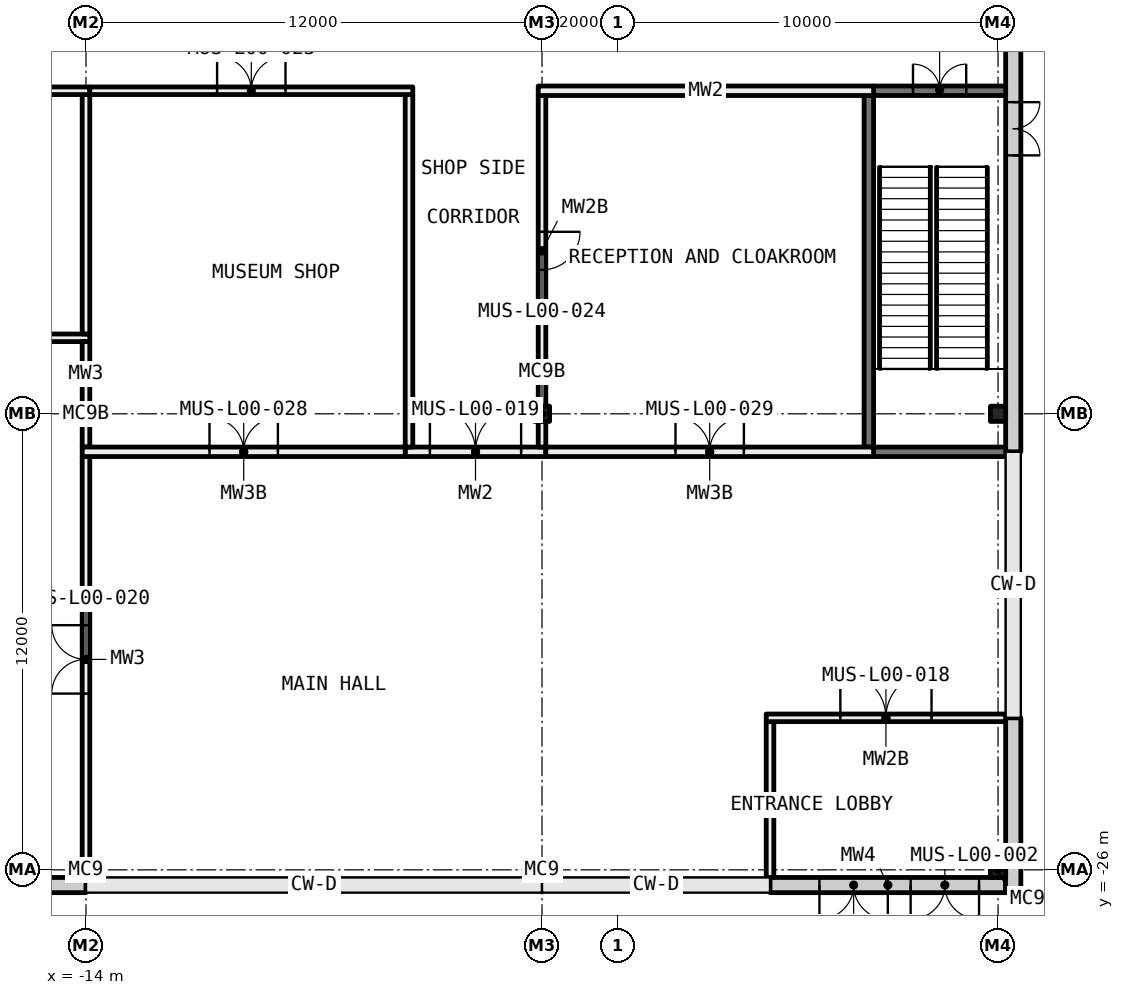
"""IFC4 building model, lengths in metres.
Left out: names, types, materials, properties, quantities, classifications, styles, units other than length and angle.
Written with IfcOpenShell. Run it as: python <this file> out.ifc"""

import sys

from ifc_helpers import new_model, si_unit, direction, frame, frame_2d, origin, origin_2d, place, context, subcontext, project, spatial, rectangle, i_section, extrude, element, fill, save


model = new_model("IFC4")
c1 = context("Model", 3, precision=1e-05, world=origin(), true_north=direction((0.0, 1.0)))
c2 = subcontext(c1, "Body", "Model", "MODEL_VIEW")
j1 = project(units=[si_unit("LENGTHUNIT", "METRE"), si_unit("PLANEANGLEUNIT", "RADIAN")], contexts=[c1])
p1 = place(None, origin())
s1 = spatial("IfcSite", under=j1, at=p1, CompositionType="ELEMENT")
p2 = place(p1, origin())
s2 = spatial("IfcBuilding", under=s1, at=p2, CompositionType="ELEMENT")
p3 = place(p2, origin())
s3 = spatial("IfcBuildingStorey", under=s2, at=p3, CompositionType="ELEMENT", Elevation=0.0)
for number, where, z_axis, x_axis in (
    (1, (-14.0, -26.0, -1.0), (0.0, 0.0, 1.0), (1.0, 0.0, 0.0)),
    (2, (-14.0, -14.0, -1.0), (0.0, 0.0, 1.0), (1.0, 0.0, 0.0)),
    (3, (-2.0, -26.0, -1.0), (0.0, 0.0, 1.0), (1.0, 0.0, 0.0)),
    (4, (-2.0, -14.0, -1.0), (0.0, 0.0, 1.0), (1.0, 0.0, 0.0)),
    (5, (10.0, -26.0, -1.0), (0.0, 0.0, 1.0), (1.0, 0.0, 0.0)),
    (6, (10.0, -14.0, -1.0), (0.0, 0.0, 1.0), (1.0, 0.0, 0.0)),
):
    element("IfcColumn", number, at=place(p3, frame(where, z_axis=z_axis, x_axis=x_axis)), inside=s3, PredefinedType="COLUMN", context=c2, shape_type="SweptSolid", body=[
        extrude(i_section(OverallWidth=0.4, OverallDepth=0.4, WebThickness=0.013, FlangeThickness=0.021, FilletRadius=0.022, at=origin_2d()), origin(), (0.0, 0.0, 1.0), 6.6),
    ])
p4 = place(p3, frame((-26.2, -12.0, 0.0), z_axis=(0.0, 0.0, 1.0), x_axis=(1.0, 0.0, 0.0)))
e7 = element("IfcWall", 7, at=p4, inside=s3, PredefinedType="PARTITIONING", context=c2, shape_type="SweptSolid", body=[
    extrude(rectangle(XDim=12.3, YDim=0.2, at=frame_2d((6.15, 0.0))), origin(), (0.0, 0.0, 1.0), 5.6),
])
p5 = place(p4, frame((5.65, 0.0, 0.0)))
e8 = element("IfcOpeningElement", 8, at=p5, cuts=e7, PredefinedType="OPENING", context=c2, shape_type="SweptSolid", body=[
    extrude(rectangle(XDim=1.0, YDim=2.1, at=frame_2d((0.5, 1.05))), frame((0.0, 0.11, 0.0), z_axis=(0.0, -1.0, 0.0), x_axis=(1.0, 0.0, 0.0)), (0.0, 0.0, 1.0), 0.22),
])
p6 = place(p3, frame((-14.0, -14.875, 0.0), z_axis=(0.0, 0.0, 1.0), x_axis=(0.0, 1.0, 0.0)))
e9 = element("IfcWall", 9, at=p6, inside=s3, PredefinedType="PARTITIONING", context=c2, shape_type="SweptSolid", body=[
    extrude(rectangle(XDim=0.675, YDim=0.2, at=frame_2d((0.337, 0.0))), origin(), (0.0, 0.0, 1.0), 5.012),
])
p7 = place(p3, frame((-14.0, -13.8, 0.0), z_axis=(0.0, 0.0, 1.0), x_axis=(0.0, 1.0, 0.0)))
e10 = element("IfcWall", 10, at=p7, inside=s3, PredefinedType="PARTITIONING", context=c2, shape_type="SweptSolid", body=[
    extrude(rectangle(XDim=1.7, YDim=0.2, at=frame_2d((0.85, 0.0))), origin(), (0.0, 0.0, 1.0), 5.012),
])
p8 = place(p3, frame((-14.0, -11.9, 0.0), z_axis=(0.0, 0.0, 1.0), x_axis=(0.0, 1.0, 0.0)))
e11 = element("IfcWall", 11, at=p8, inside=s3, PredefinedType="PARTITIONING", context=c2, shape_type="SweptSolid", body=[
    extrude(rectangle(XDim=6.3, YDim=0.2, at=frame_2d((3.15, 0.0))), origin(), (0.0, 0.0, 1.0), 5.012),
])
p9 = place(p3, frame((-26.2, -5.5, 0.0), z_axis=(0.0, 0.0, 1.0), x_axis=(1.0, 0.0, 0.0)))
e12 = element("IfcWall", 12, at=p9, inside=s3, PredefinedType="PARTITIONING", context=c2, shape_type="SweptSolid", body=[
    extrude(rectangle(XDim=12.3, YDim=0.2, at=frame_2d((6.15, 0.0))), origin(), (0.0, 0.0, 1.0), 5.6),
])
p10 = place(p9, frame((5.65, 0.0, 0.0)))
e13 = element("IfcOpeningElement", 13, at=p10, cuts=e12, PredefinedType="OPENING", context=c2, shape_type="SweptSolid", body=[
    extrude(rectangle(XDim=1.0, YDim=2.1, at=frame_2d((0.5, 1.05))), frame((0.0, 0.11, 0.0), z_axis=(0.0, -1.0, 0.0), x_axis=(1.0, 0.0, 0.0)), (0.0, 0.0, 1.0), 0.22),
])
p11 = place(p3, frame((-5.6, -15.0, 0.0), z_axis=(0.0, 0.0, 1.0), x_axis=(1.0, 0.0, 0.0)))
e14 = element("IfcWall", 14, at=p11, inside=s3, PredefinedType="PARTITIONING", context=c2, shape_type="SweptSolid", body=[
    extrude(rectangle(XDim=3.7, YDim=0.25, at=frame_2d((1.85, 0.0))), origin(), (0.0, 0.0, 1.0), 5.6),
])
p12 = place(p11, frame((0.65, 0.0, 0.0)))
e15 = element("IfcOpeningElement", 15, at=p12, cuts=e14, PredefinedType="OPENING", context=c2, shape_type="SweptSolid", body=[
    extrude(rectangle(XDim=2.4, YDim=2.1, at=frame_2d((1.2, 1.05))), frame((0.0, 0.135, 0.0), z_axis=(0.0, -1.0, 0.0), x_axis=(1.0, 0.0, 0.0)), (0.0, 0.0, 1.0), 0.27),
])
p13 = place(p3, frame((-5.5, -14.875, 0.0), z_axis=(0.0, 0.0, 1.0), x_axis=(0.0, 1.0, 0.0)))
e16 = element("IfcWall", 16, at=p13, inside=s3, PredefinedType="PARTITIONING", context=c2, shape_type="SweptSolid", body=[
    extrude(rectangle(XDim=9.275, YDim=0.2, at=frame_2d((4.637, 0.0))), origin(), (0.0, 0.0, 1.0), 5.6),
])
p14 = place(p3, frame((-13.9, -5.5, 0.0), z_axis=(0.0, 0.0, 1.0), x_axis=(1.0, 0.0, 0.0)))
e17 = element("IfcWall", 17, at=p14, inside=s3, PredefinedType="PARTITIONING", context=c2, shape_type="SweptSolid", body=[
    extrude(rectangle(XDim=8.5, YDim=0.2, at=frame_2d((4.25, 0.0))), origin(), (0.0, 0.0, 1.0), 5.6),
])
p15 = place(p14, frame((3.35, 0.0, 0.0)))
e18 = element("IfcOpeningElement", 18, at=p15, cuts=e17, PredefinedType="OPENING", context=c2, shape_type="SweptSolid", body=[
    extrude(rectangle(XDim=1.8, YDim=2.1, at=frame_2d((0.9, 1.05))), frame((0.0, 0.11, 0.0), z_axis=(0.0, -1.0, 0.0), x_axis=(1.0, 0.0, 0.0)), (0.0, 0.0, 1.0), 0.22),
])
p16 = place(p3, frame((-2.0, -14.875, 0.0), z_axis=(0.0, 0.0, 1.0), x_axis=(0.0, 1.0, 0.0)))
e19 = element("IfcWall", 19, at=p16, inside=s3, PredefinedType="PARTITIONING", context=c2, shape_type="SweptSolid", body=[
    extrude(rectangle(XDim=0.675, YDim=0.2, at=frame_2d((0.337, 0.0))), origin(), (0.0, 0.0, 1.0), 5.6),
])
p17 = place(p3, frame((-2.0, -13.8, 0.0), z_axis=(0.0, 0.0, 1.0), x_axis=(0.0, 1.0, 0.0)))
e20 = element("IfcWall", 20, at=p17, inside=s3, PredefinedType="PARTITIONING", context=c2, shape_type="SweptSolid", body=[
    extrude(rectangle(XDim=8.175, YDim=0.2, at=frame_2d((4.087, 0.0))), origin(), (0.0, 0.0, 1.0), 5.012),
])
p18 = place(p17, frame((3.588, 0.0, 0.0)))
e21 = element("IfcOpeningElement", 21, at=p18, cuts=e20, PredefinedType="OPENING", context=c2, shape_type="SweptSolid", body=[
    extrude(rectangle(XDim=1.0, YDim=2.1, at=frame_2d((0.5, 1.05))), frame((0.0, 0.11, 0.0), z_axis=(0.0, -1.0, 0.0), x_axis=(1.0, 0.0, 0.0)), (0.0, 0.0, 1.0), 0.22),
])
p19 = place(p3, frame((-2.1, -5.5, 0.0), z_axis=(0.0, 0.0, 1.0), x_axis=(1.0, 0.0, 0.0)))
e22 = element("IfcWall", 22, at=p19, inside=s3, PredefinedType="PARTITIONING", context=c2, shape_type="SweptSolid", body=[
    extrude(rectangle(XDim=8.825, YDim=0.25, at=frame_2d((4.413, 0.0))), origin(), (0.0, 0.0, 1.0), 5.6),
])
p20 = place(p3, frame((6.725, -5.5, -1.0), z_axis=(0.0, 0.0, 1.0), x_axis=(1.0, 0.0, 0.0)))
e23 = element("IfcWall", 23, at=p20, inside=s3, PredefinedType="SHEAR", context=c2, shape_type="SweptSolid", body=[
    extrude(rectangle(XDim=3.475, YDim=0.25, at=frame_2d((1.737, 0.0))), origin(), (0.0, 0.0, 1.0), 6.6),
])
p21 = place(p20, frame((1.037, 0.0, 1.0)))
e24 = element("IfcOpeningElement", 24, at=p21, cuts=e23, PredefinedType="OPENING", context=c2, shape_type="SweptSolid", body=[
    extrude(rectangle(XDim=1.4, YDim=2.1, at=frame_2d((0.7, 1.05))), frame((0.0, 0.135, 0.0), z_axis=(0.0, -1.0, 0.0), x_axis=(1.0, 0.0, 0.0)), (0.0, 0.0, 1.0), 0.27),
])
p22 = place(p3, frame((4.0, -26.2, 0.0), z_axis=(0.0, 0.0, 1.0), x_axis=(0.0, 1.0, 0.0)))
e25 = element("IfcWall", 25, at=p22, inside=s3, PredefinedType="PARTITIONING", context=c2, shape_type="SweptSolid", body=[
    extrude(rectangle(XDim=4.1, YDim=0.2, at=frame_2d((2.05, 0.0))), origin(), (0.0, 0.0, 1.0), 5.6),
])
p23 = place(p3, frame((3.9, -22.0, 0.0), z_axis=(0.0, 0.0, 1.0), x_axis=(1.0, 0.0, 0.0)))
e26 = element("IfcWall", 26, at=p23, inside=s3, PredefinedType="PARTITIONING", context=c2, shape_type="SweptSolid", body=[
    extrude(rectangle(XDim=6.3, YDim=0.2, at=frame_2d((3.15, 0.0))), origin(), (0.0, 0.0, 1.0), 5.6),
])
p24 = place(p23, frame((1.95, 0.0, 0.0)))
e27 = element("IfcOpeningElement", 27, at=p24, cuts=e26, PredefinedType="OPENING", context=c2, shape_type="SweptSolid", body=[
    extrude(rectangle(XDim=2.4, YDim=2.1, at=frame_2d((1.2, 1.05))), frame((0.0, 0.11, 0.0), z_axis=(0.0, -1.0, 0.0), x_axis=(1.0, 0.0, 0.0)), (0.0, 0.0, 1.0), 0.22),
])
p25 = place(p3, frame((-14.0, -25.8, 0.0), z_axis=(0.0, 0.0, 1.0), x_axis=(0.0, 1.0, 0.0)))
e28 = element("IfcWall", 28, at=p25, inside=s3, PredefinedType="PARTITIONING", context=c2, shape_type="SweptSolid", body=[
    extrude(rectangle(XDim=10.675, YDim=0.2, at=frame_2d((5.337, 0.0))), origin(), (0.0, 0.0, 1.0), 5.012),
])
p26 = place(p25, frame((4.438, 0.0, 0.0)))
e29 = element("IfcOpeningElement", 29, at=p26, cuts=e28, PredefinedType="OPENING", context=c2, shape_type="SweptSolid", body=[
    extrude(rectangle(XDim=1.8, YDim=2.1, at=frame_2d((0.9, 1.05))), frame((0.0, 0.11, 0.0), z_axis=(0.0, -1.0, 0.0), x_axis=(1.0, 0.0, 0.0)), (0.0, 0.0, 1.0), 0.22),
])
p27 = place(p3, frame((-14.1, -15.0, 0.0), z_axis=(0.0, 0.0, 1.0), x_axis=(1.0, 0.0, 0.0)))
e30 = element("IfcWall", 30, at=p27, inside=s3, PredefinedType="PARTITIONING", context=c2, shape_type="SweptSolid", body=[
    extrude(rectangle(XDim=8.5, YDim=0.25, at=frame_2d((4.25, 0.0))), origin(), (0.0, 0.0, 1.0), 5.6),
])
p28 = place(p27, frame((3.35, 0.0, 0.0)))
e31 = element("IfcOpeningElement", 31, at=p28, cuts=e30, PredefinedType="OPENING", context=c2, shape_type="SweptSolid", body=[
    extrude(rectangle(XDim=1.8, YDim=2.1, at=frame_2d((0.9, 1.05))), frame((0.0, 0.135, 0.0), z_axis=(0.0, -1.0, 0.0), x_axis=(1.0, 0.0, 0.0)), (0.0, 0.0, 1.0), 0.27),
])
p29 = place(p3, frame((-1.9, -15.0, 0.0), z_axis=(0.0, 0.0, 1.0), x_axis=(1.0, 0.0, 0.0)))
e32 = element("IfcWall", 32, at=p29, inside=s3, PredefinedType="PARTITIONING", context=c2, shape_type="SweptSolid", body=[
    extrude(rectangle(XDim=8.625, YDim=0.25, at=frame_2d((4.312, 0.0))), origin(), (0.0, 0.0, 1.0), 5.6),
])
p30 = place(p29, frame((3.412, 0.0, 0.0)))
e33 = element("IfcOpeningElement", 33, at=p30, cuts=e32, PredefinedType="OPENING", context=c2, shape_type="SweptSolid", body=[
    extrude(rectangle(XDim=1.8, YDim=2.1, at=frame_2d((0.9, 1.05))), frame((0.0, 0.135, 0.0), z_axis=(0.0, -1.0, 0.0), x_axis=(1.0, 0.0, 0.0)), (0.0, 0.0, 1.0), 0.27),
])
p31 = place(p3, frame((6.725, -15.0, -1.0), z_axis=(0.0, 0.0, 1.0), x_axis=(1.0, 0.0, 0.0)))
e34 = element("IfcWall", 34, at=p31, inside=s3, PredefinedType="SHEAR", context=c2, shape_type="SweptSolid", body=[
    extrude(rectangle(XDim=3.475, YDim=0.25, at=frame_2d((1.737, 0.0))), origin(), (0.0, 0.0, 1.0), 6.6),
])
p32 = place(p3, frame((6.6, -14.875, -1.0), z_axis=(0.0, 0.0, 1.0), x_axis=(0.0, 1.0, 0.0)))
e35 = element("IfcWall", 35, at=p32, inside=s3, PredefinedType="SHEAR", context=c2, shape_type="SweptSolid", body=[
    extrude(rectangle(XDim=9.25, YDim=0.25, at=frame_2d((4.625, 0.0))), origin(), (0.0, 0.0, 1.0), 6.6),
])
p33 = place(p3, frame((4.0, -26.4, -0.4), z_axis=(0.0, 0.0, 1.0), x_axis=(1.0, 0.0, 0.0)))
e36 = element("IfcWall", 36, at=p33, inside=s3, PredefinedType="STANDARD", context=c2, shape_type="SweptSolid", body=[
    extrude(rectangle(XDim=6.2, YDim=0.4, at=frame_2d((3.1, 0.0))), origin(), (0.0, 0.0, 1.0), 6.0),
])
p34 = place(p33, frame((1.3, 0.0, 0.4)))
e37 = element("IfcOpeningElement", 37, at=p34, cuts=e36, PredefinedType="OPENING", context=c2, shape_type="SweptSolid", body=[
    extrude(rectangle(XDim=1.8, YDim=2.4, at=frame_2d((0.9, 1.2))), frame((0.0, 0.21, 0.0), z_axis=(0.0, -1.0, 0.0), x_axis=(1.0, 0.0, 0.0)), (0.0, 0.0, 1.0), 0.42),
])
p35 = place(p33, frame((3.7, 0.0, 0.4)))
e38 = element("IfcOpeningElement", 38, at=p35, cuts=e36, PredefinedType="OPENING", context=c2, shape_type="SweptSolid", body=[
    extrude(rectangle(XDim=1.8, YDim=2.4, at=frame_2d((0.9, 1.2))), frame((0.0, 0.21, 0.0), z_axis=(0.0, -1.0, 0.0), x_axis=(1.0, 0.0, 0.0)), (0.0, 0.0, 1.0), 0.42),
])
p36 = place(p3, frame((-26.6, -26.4, -0.4), z_axis=(0.0, 0.0, 1.0), x_axis=(1.0, 0.0, 0.0)))
e39 = element("IfcWall", 39, at=p36, inside=s3, PredefinedType="STANDARD", context=c2, shape_type="SweptSolid", body=[
    extrude(rectangle(XDim=12.6, YDim=0.4, at=frame_2d((6.3, 0.0))), origin(), (0.0, 0.0, 1.0), 6.0),
])
p37 = place(p36, frame((2.6, 0.0, 1.3)))
e40 = element("IfcOpeningElement", 40, at=p37, cuts=e39, PredefinedType="OPENING", context=c2, shape_type="SweptSolid", body=[
    extrude(rectangle(XDim=2.0, YDim=3.6, at=frame_2d((1.0, 1.8))), frame((0.0, 0.21, 0.0), z_axis=(0.0, -1.0, 0.0), x_axis=(1.0, 0.0, 0.0)), (0.0, 0.0, 1.0), 0.42),
])
p38 = place(p36, frame((5.6, 0.0, 1.3)))
e41 = element("IfcOpeningElement", 41, at=p38, cuts=e39, PredefinedType="OPENING", context=c2, shape_type="SweptSolid", body=[
    extrude(rectangle(XDim=2.0, YDim=3.6, at=frame_2d((1.0, 1.8))), frame((0.0, 0.21, 0.0), z_axis=(0.0, -1.0, 0.0), x_axis=(1.0, 0.0, 0.0)), (0.0, 0.0, 1.0), 0.42),
])
p39 = place(p36, frame((8.6, 0.0, 1.3)))
e42 = element("IfcOpeningElement", 42, at=p39, cuts=e39, PredefinedType="OPENING", context=c2, shape_type="SweptSolid", body=[
    extrude(rectangle(XDim=2.0, YDim=3.6, at=frame_2d((1.0, 1.8))), frame((0.0, 0.21, 0.0), z_axis=(0.0, -1.0, 0.0), x_axis=(1.0, 0.0, 0.0)), (0.0, 0.0, 1.0), 0.42),
])
p40 = place(p3, frame((10.4, -26.6, -0.4), z_axis=(0.0, 0.0, 1.0), x_axis=(0.0, 1.0, 0.0)))
e43 = element("IfcWall", 43, at=p40, inside=s3, PredefinedType="STANDARD", context=c2, shape_type="SweptSolid", body=[
    extrude(rectangle(XDim=4.6, YDim=0.4, at=frame_2d((2.3, 0.0))), origin(), (0.0, 0.0, 1.0), 6.0),
])
p41 = place(p3, frame((10.4, -15.0, -0.4), z_axis=(0.0, 0.0, 1.0), x_axis=(0.0, 1.0, 0.0)))
e44 = element("IfcWall", 44, at=p41, inside=s3, PredefinedType="STANDARD", context=c2, shape_type="SweptSolid", body=[
    extrude(rectangle(XDim=13.2, YDim=0.4, at=frame_2d((6.6, 0.0))), origin(), (0.0, 0.0, 1.0), 6.0),
])
p42 = place(p41, frame((7.8, 0.0, 0.4)))
e45 = element("IfcOpeningElement", 45, at=p42, cuts=e44, PredefinedType="OPENING", context=c2, shape_type="SweptSolid", body=[
    extrude(rectangle(XDim=1.4, YDim=2.1, at=frame_2d((0.7, 1.05))), frame((0.0, 0.21, 0.0), z_axis=(0.0, -1.0, 0.0), x_axis=(1.0, 0.0, 0.0)), (0.0, 0.0, 1.0), 0.42),
])
p43 = place(p34, frame((1.8, 0.0, 0.0), x_axis=(-1.0, 0.0, 0.0)))
e46 = element("IfcDoor", 46, at=p43, inside=s3, OperationType="DOUBLE_DOOR_SINGLE_SWING", PredefinedType="DOOR", context=c2, shape_type="SweptSolid", body=[
    extrude(rectangle(XDim=1.8, YDim=2.4, at=frame_2d((0.9, 1.2))), frame((0.0, 0.025, 0.0), z_axis=(0.0, -1.0, 0.0), x_axis=(1.0, 0.0, 0.0)), (0.0, 0.0, 1.0), 0.05),
])
fill(e37, e46)
p44 = place(p35, frame((1.8, 0.0, 0.0), x_axis=(-1.0, 0.0, 0.0)))
e47 = element("IfcDoor", 47, at=p44, inside=s3, OperationType="DOUBLE_DOOR_SINGLE_SWING", PredefinedType="DOOR", context=c2, shape_type="SweptSolid", body=[
    extrude(rectangle(XDim=1.8, YDim=2.4, at=frame_2d((0.9, 1.2))), frame((0.0, 0.025, 0.0), z_axis=(0.0, -1.0, 0.0), x_axis=(1.0, 0.0, 0.0)), (0.0, 0.0, 1.0), 0.05),
])
fill(e38, e47)
p45 = place(p42, frame((1.4, 0.0, 0.0), x_axis=(-1.0, 0.0, 0.0)))
e48 = element("IfcDoor", 48, at=p45, inside=s3, OperationType="DOUBLE_DOOR_SINGLE_SWING", PredefinedType="DOOR", context=c2, shape_type="SweptSolid", body=[
    extrude(rectangle(XDim=1.4, YDim=2.1, at=frame_2d((0.7, 1.05))), frame((0.0, 0.025, 0.0), z_axis=(0.0, -1.0, 0.0), x_axis=(1.0, 0.0, 0.0)), (0.0, 0.0, 1.0), 0.05),
])
fill(e45, e48)
p46 = place(p21, origin())
e49 = element("IfcDoor", 49, at=p46, inside=s3, OperationType="DOUBLE_DOOR_SINGLE_SWING", PredefinedType="DOOR", context=c2, shape_type="SweptSolid", body=[
    extrude(rectangle(XDim=1.4, YDim=2.1, at=frame_2d((0.7, 1.05))), frame((0.0, 0.025, 0.0), z_axis=(0.0, -1.0, 0.0), x_axis=(1.0, 0.0, 0.0)), (0.0, 0.0, 1.0), 0.05),
])
fill(e24, e49)
p47 = place(p24, origin())
e50 = element("IfcDoor", 50, at=p47, inside=s3, OperationType="DOUBLE_DOOR_SINGLE_SWING", PredefinedType="DOOR", context=c2, shape_type="SweptSolid", body=[
    extrude(rectangle(XDim=2.4, YDim=2.1, at=frame_2d((1.2, 1.05))), frame((0.0, 0.025, 0.0), z_axis=(0.0, -1.0, 0.0), x_axis=(1.0, 0.0, 0.0)), (0.0, 0.0, 1.0), 0.05),
])
fill(e27, e50)
p48 = place(p12, origin())
e51 = element("IfcDoor", 51, at=p48, inside=s3, OperationType="DOUBLE_DOOR_SINGLE_SWING", PredefinedType="DOOR", context=c2, shape_type="SweptSolid", body=[
    extrude(rectangle(XDim=2.4, YDim=2.1, at=frame_2d((1.2, 1.05))), frame((0.0, 0.025, 0.0), z_axis=(0.0, -1.0, 0.0), x_axis=(1.0, 0.0, 0.0)), (0.0, 0.0, 1.0), 0.05),
])
fill(e15, e51)
p49 = place(p26, origin())
e52 = element("IfcDoor", 52, at=p49, inside=s3, OperationType="DOUBLE_DOOR_SINGLE_SWING", PredefinedType="DOOR", context=c2, shape_type="SweptSolid", body=[
    extrude(rectangle(XDim=1.8, YDim=2.1, at=frame_2d((0.9, 1.05))), frame((0.0, 0.025, 0.0), z_axis=(0.0, -1.0, 0.0), x_axis=(1.0, 0.0, 0.0)), (0.0, 0.0, 1.0), 0.05),
])
fill(e29, e52)
p50 = place(p15, origin())
e53 = element("IfcDoor", 53, at=p50, inside=s3, OperationType="DOUBLE_DOOR_SINGLE_SWING", PredefinedType="DOOR", context=c2, shape_type="SweptSolid", body=[
    extrude(rectangle(XDim=1.8, YDim=2.1, at=frame_2d((0.9, 1.05))), frame((0.0, 0.025, 0.0), z_axis=(0.0, -1.0, 0.0), x_axis=(1.0, 0.0, 0.0)), (0.0, 0.0, 1.0), 0.05),
])
fill(e18, e53)
p51 = place(p18, frame((1.0, 0.0, 0.0), x_axis=(-1.0, 0.0, 0.0)))
e54 = element("IfcDoor", 54, at=p51, inside=s3, OperationType="SINGLE_SWING_RIGHT", PredefinedType="DOOR", context=c2, shape_type="SweptSolid", body=[
    extrude(rectangle(XDim=1.0, YDim=2.1, at=frame_2d((0.5, 1.05))), frame((0.0, 0.025, 0.0), z_axis=(0.0, -1.0, 0.0), x_axis=(1.0, 0.0, 0.0)), (0.0, 0.0, 1.0), 0.05),
])
fill(e21, e54)
p52 = place(p28, origin())
e55 = element("IfcDoor", 55, at=p52, inside=s3, OperationType="DOUBLE_DOOR_SINGLE_SWING", PredefinedType="DOOR", context=c2, shape_type="SweptSolid", body=[
    extrude(rectangle(XDim=1.8, YDim=2.1, at=frame_2d((0.9, 1.05))), frame((0.0, 0.025, 0.0), z_axis=(0.0, -1.0, 0.0), x_axis=(1.0, 0.0, 0.0)), (0.0, 0.0, 1.0), 0.05),
])
fill(e31, e55)
p53 = place(p30, origin())
e56 = element("IfcDoor", 56, at=p53, inside=s3, OperationType="DOUBLE_DOOR_SINGLE_SWING", PredefinedType="DOOR", context=c2, shape_type="SweptSolid", body=[
    extrude(rectangle(XDim=1.8, YDim=2.1, at=frame_2d((0.9, 1.05))), frame((0.0, 0.025, 0.0), z_axis=(0.0, -1.0, 0.0), x_axis=(1.0, 0.0, 0.0)), (0.0, 0.0, 1.0), 0.05),
])
fill(e33, e56)
save(model, sys.argv[1])
